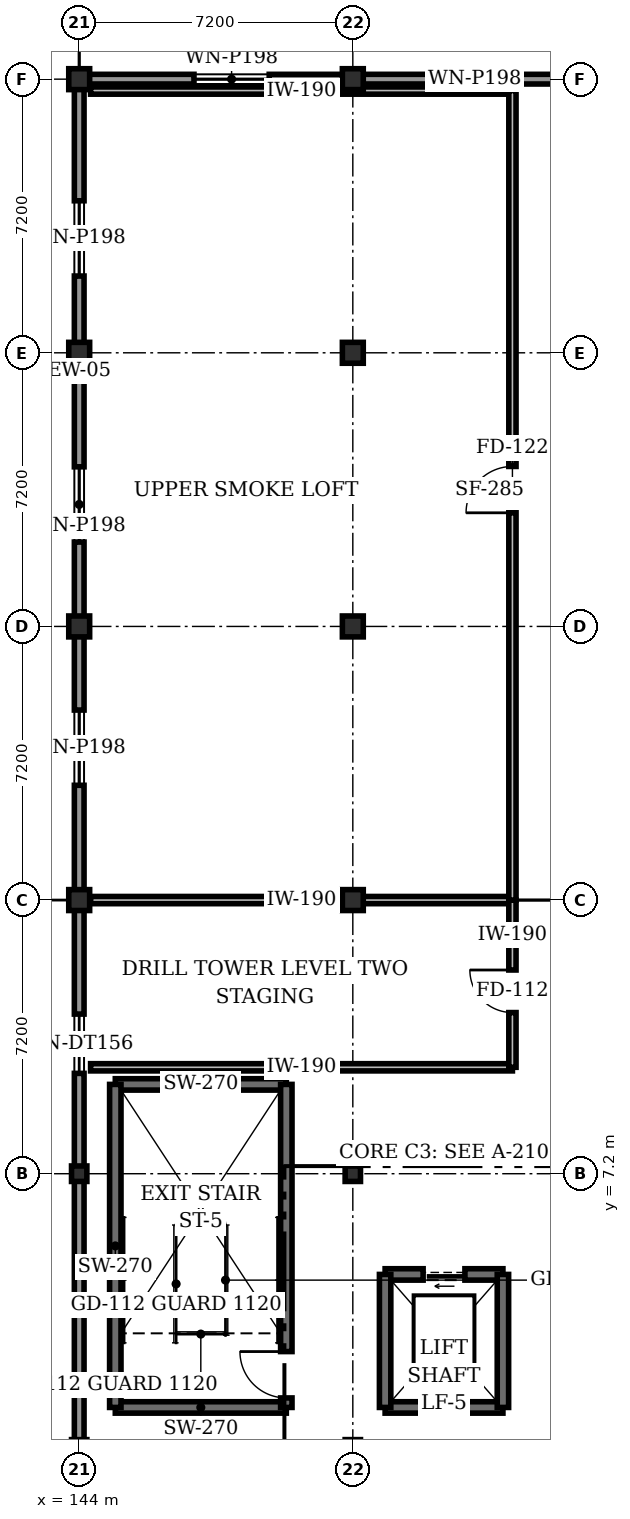
"""IFC4 building model, lengths in metres.
Left out: names, types, materials, properties, quantities, classifications, styles, units other than length and angle.
Written with IfcOpenShell. Run it as: python <this file> out.ifc"""

import sys

from ifc_helpers import new_model, si_unit, direction, frame, frame_2d, origin, origin_2d, place, context, subcontext, project, spatial, rectangle, i_section, extrude, element, fill, save


model = new_model("IFC4")
c1 = context("Model", 3, precision=1e-05, world=origin(), true_north=direction((0.0, 1.0)))
c2 = subcontext(c1, "Body", "Model", "MODEL_VIEW")
j1 = project(units=[si_unit("LENGTHUNIT", "METRE"), si_unit("PLANEANGLEUNIT", "RADIAN")], contexts=[c1])
p1 = place(None, origin())
s1 = spatial("IfcSite", under=j1, at=p1, CompositionType="ELEMENT")
p2 = place(p1, origin())
s2 = spatial("IfcBuilding", under=s1, at=p2, CompositionType="ELEMENT")
p3 = place(p2, frame((0.0, 0.0, 6.0)))
s3 = spatial("IfcBuildingStorey", under=s2, at=p3, CompositionType="ELEMENT", Elevation=6.0)
for number, where, z_axis, x_axis in (
    (1, (144.0, 0.0, 0.0), (0.0, 0.0, 1.0), (1.0, 0.0, 0.0)),
    (2, (144.0, 7.2, 0.0), (0.0, 0.0, 1.0), (1.0, 0.0, 0.0)),
):
    element("IfcColumn", number, at=place(p3, frame(where, z_axis=z_axis, x_axis=x_axis)), inside=s3, PredefinedType="COLUMN", context=c2, shape_type="SweptSolid", body=[
        extrude(i_section(OverallWidth=0.404, OverallDepth=0.407, WebThickness=0.027, FlangeThickness=0.044, at=origin_2d()), origin(), (0.0, 0.0, 1.0), 4.2),
    ])
for number, where, z_axis, x_axis in (
    (3, (144.0, 14.4, 0.0), (0.0, 0.0, 1.0), (1.0, 0.0, 0.0)),
    (4, (144.0, 21.6, 0.0), (0.0, 0.0, 1.0), (1.0, 0.0, 0.0)),
    (5, (144.0, 28.8, 0.0), (0.0, 0.0, 1.0), (1.0, 0.0, 0.0)),
    (6, (144.0, 36.0, 0.0), (0.0, 0.0, 1.0), (1.0, 0.0, 0.0)),
):
    element("IfcColumn", number, at=place(p3, frame(where, z_axis=z_axis, x_axis=x_axis)), inside=s3, PredefinedType="COLUMN", context=c2, shape_type="SweptSolid", body=[
        extrude(rectangle(XDim=0.55, YDim=0.55, at=origin_2d()), origin(), (0.0, 0.0, 1.0), 4.2),
    ])
for number, where, z_axis, x_axis in (
    (7, (151.2, 0.0, 0.0), (0.0, 0.0, 1.0), (1.0, 0.0, 0.0)),
    (8, (151.2, 7.2, 0.0), (0.0, 0.0, 1.0), (1.0, 0.0, 0.0)),
):
    element("IfcColumn", number, at=place(p3, frame(where, z_axis=z_axis, x_axis=x_axis)), inside=s3, PredefinedType="COLUMN", context=c2, shape_type="SweptSolid", body=[
        extrude(i_section(OverallWidth=0.404, OverallDepth=0.407, WebThickness=0.027, FlangeThickness=0.044, at=origin_2d()), origin(), (0.0, 0.0, 1.0), 4.2),
    ])
for number, where, z_axis, x_axis in (
    (9, (151.2, 14.4, 0.0), (0.0, 0.0, 1.0), (1.0, 0.0, 0.0)),
    (10, (151.2, 21.6, 0.0), (0.0, 0.0, 1.0), (1.0, 0.0, 0.0)),
    (11, (151.2, 28.8, 0.0), (0.0, 0.0, 1.0), (1.0, 0.0, 0.0)),
    (12, (151.2, 36.0, 0.0), (0.0, 0.0, 1.0), (1.0, 0.0, 0.0)),
):
    element("IfcColumn", number, at=place(p3, frame(where, z_axis=z_axis, x_axis=x_axis)), inside=s3, PredefinedType="COLUMN", context=c2, shape_type="SweptSolid", body=[
        extrude(rectangle(XDim=0.55, YDim=0.55, at=origin_2d()), origin(), (0.0, 0.0, 1.0), 4.2),
    ])
p4 = place(p3, frame((144.0, 36.0, 0.0), z_axis=(0.0, 0.0, 1.0), x_axis=(0.0, -1.0, 0.0)))
e13 = element("IfcWall", 13, at=p4, inside=s3, PredefinedType="STANDARD", context=c2, shape_type="SweptSolid", body=[
    extrude(rectangle(XDim=21.6, YDim=0.255, at=frame_2d((10.8, 0.0))), origin(), (0.0, 0.0, 1.0), 3.247),
])
p5 = place(p4, frame((3.2, 0.0, 1.15)))
e14 = element("IfcOpeningElement", 14, at=p5, cuts=e13, PredefinedType="OPENING", context=c2, shape_type="SweptSolid", body=[
    extrude(rectangle(XDim=1.98, YDim=1.72, at=frame_2d((0.99, 0.86))), frame((0.0, 0.137, 0.0), z_axis=(0.0, -1.0, 0.0), x_axis=(1.0, 0.0, 0.0)), (0.0, 0.0, 1.0), 0.275),
])
p6 = place(p4, frame((10.2, 0.0, 1.15)))
e15 = element("IfcOpeningElement", 15, at=p6, cuts=e13, PredefinedType="OPENING", context=c2, shape_type="SweptSolid", body=[
    extrude(rectangle(XDim=1.98, YDim=1.72, at=frame_2d((0.99, 0.86))), frame((0.0, 0.137, 0.0), z_axis=(0.0, -1.0, 0.0), x_axis=(1.0, 0.0, 0.0)), (0.0, 0.0, 1.0), 0.275),
])
p7 = place(p4, frame((16.6, 0.0, 1.15)))
e16 = element("IfcOpeningElement", 16, at=p7, cuts=e13, PredefinedType="OPENING", context=c2, shape_type="SweptSolid", body=[
    extrude(rectangle(XDim=1.98, YDim=1.72, at=frame_2d((0.99, 0.86))), frame((0.0, 0.137, 0.0), z_axis=(0.0, -1.0, 0.0), x_axis=(1.0, 0.0, 0.0)), (0.0, 0.0, 1.0), 0.275),
])
p8 = place(p3, frame((165.6, 36.0, 0.0), z_axis=(0.0, 0.0, 1.0), x_axis=(-1.0, 0.0, 0.0)))
e17 = element("IfcWall", 17, at=p8, inside=s3, PredefinedType="STANDARD", context=c2, shape_type="SweptSolid", body=[
    extrude(rectangle(XDim=21.6, YDim=0.255, at=frame_2d((10.8, 0.0))), origin(), (0.0, 0.0, 1.0), 3.25),
])
p9 = place(p8, frame((3.2, 0.0, 1.15)))
e18 = element("IfcOpeningElement", 18, at=p9, cuts=e17, PredefinedType="OPENING", context=c2, shape_type="SweptSolid", body=[
    extrude(rectangle(XDim=1.98, YDim=1.72, at=frame_2d((0.99, 0.86))), frame((0.0, 0.137, 0.0), z_axis=(0.0, -1.0, 0.0), x_axis=(1.0, 0.0, 0.0)), (0.0, 0.0, 1.0), 0.275),
])
p10 = place(p8, frame((10.2, 0.0, 1.15)))
e19 = element("IfcOpeningElement", 19, at=p10, cuts=e17, PredefinedType="OPENING", context=c2, shape_type="SweptSolid", body=[
    extrude(rectangle(XDim=1.98, YDim=1.72, at=frame_2d((0.99, 0.86))), frame((0.0, 0.137, 0.0), z_axis=(0.0, -1.0, 0.0), x_axis=(1.0, 0.0, 0.0)), (0.0, 0.0, 1.0), 0.275),
])
p11 = place(p8, frame((16.6, 0.0, 1.15)))
e20 = element("IfcOpeningElement", 20, at=p11, cuts=e17, PredefinedType="OPENING", context=c2, shape_type="SweptSolid", body=[
    extrude(rectangle(XDim=1.98, YDim=1.72, at=frame_2d((0.99, 0.86))), frame((0.0, 0.137, 0.0), z_axis=(0.0, -1.0, 0.0), x_axis=(1.0, 0.0, 0.0)), (0.0, 0.0, 1.0), 0.275),
])
p12 = place(p3, frame((144.0, 14.4, 0.0), z_axis=(0.0, 0.0, 1.0), x_axis=(0.0, -1.0, 0.0)))
e21 = element("IfcWall", 21, at=p12, inside=s3, PredefinedType="STANDARD", context=c2, shape_type="SweptSolid", body=[
    extrude(rectangle(XDim=14.4, YDim=0.255, at=frame_2d((7.2, 0.0))), origin(), (0.0, 0.0, 1.0), 3.247),
])
p13 = place(p12, frame((3.0, 0.0, 1.15)))
e22 = element("IfcOpeningElement", 22, at=p13, cuts=e21, PredefinedType="OPENING", context=c2, shape_type="SweptSolid", body=[
    extrude(rectangle(XDim=1.56, YDim=1.5, at=frame_2d((0.78, 0.75))), frame((0.0, 0.137, 0.0), z_axis=(0.0, -1.0, 0.0), x_axis=(1.0, 0.0, 0.0)), (0.0, 0.0, 1.0), 0.275),
])
for number, where, z_axis, x_axis in (
    (23, (144.95, 1.05, 0.0), (0.0, 0.0, 1.0), (1.0, 0.0, 0.0)),
    (24, (149.45, 9.55, 0.0), (0.0, 0.0, 1.0), (-1.0, 0.0, 0.0)),
):
    element("IfcWall", number, at=place(p3, frame(where, z_axis=z_axis, x_axis=x_axis)), inside=s3, PredefinedType="SHEAR", context=c2, shape_type="SweptSolid", body=[
        extrude(rectangle(XDim=4.5, YDim=0.3, at=frame_2d((2.25, 0.0))), origin(), (0.0, 0.0, 1.0), 3.94),
    ])
p14 = place(p3, frame((144.95, 9.55, 0.0), z_axis=(0.0, 0.0, 1.0), x_axis=(0.0, -1.0, 0.0)))
e25 = element("IfcWall", 25, at=p14, inside=s3, PredefinedType="SHEAR", context=c2, shape_type="SweptSolid", body=[
    extrude(rectangle(XDim=8.5, YDim=0.3, at=frame_2d((4.25, 0.0))), origin(), (0.0, 0.0, 1.0), 3.94),
])
p15 = place(p3, frame((149.45, 1.05, 0.0), z_axis=(0.0, 0.0, 1.0), x_axis=(0.0, 1.0, 0.0)))
e26 = element("IfcWall", 26, at=p15, inside=s3, PredefinedType="SHEAR", context=c2, shape_type="SweptSolid", body=[
    extrude(rectangle(XDim=8.5, YDim=0.3, at=frame_2d((4.25, 0.0))), origin(), (0.0, 0.0, 1.0), 3.94),
])
p16 = place(p15, frame((0.25, 0.0, 0.0)))
e27 = element("IfcOpeningElement", 27, at=p16, cuts=e26, PredefinedType="OPENING", context=c2, shape_type="SweptSolid", body=[
    extrude(rectangle(XDim=1.22, YDim=2.16, at=frame_2d((0.61, 1.08))), frame((0.0, 0.16, 0.0), z_axis=(0.0, -1.0, 0.0), x_axis=(1.0, 0.0, 0.0)), (0.0, 0.0, 1.0), 0.32),
])
p17 = place(p3, frame((152.05, 1.05, 0.0), z_axis=(0.0, 0.0, 1.0), x_axis=(1.0, 0.0, 0.0)))
e28 = element("IfcWall", 28, at=p17, inside=s3, PredefinedType="SHEAR", context=c2, shape_type="SweptSolid", body=[
    extrude(rectangle(XDim=3.1, YDim=0.3, at=frame_2d((1.55, 0.0))), origin(), (0.0, 0.0, 1.0), 3.94),
])
p18 = place(p3, frame((155.15, 4.55, 0.0), z_axis=(0.0, 0.0, 1.0), x_axis=(-1.0, 0.0, 0.0)))
e29 = element("IfcWall", 29, at=p18, inside=s3, PredefinedType="SHEAR", context=c2, shape_type="SweptSolid", body=[
    extrude(rectangle(XDim=3.1, YDim=0.3, at=frame_2d((1.55, 0.0))), origin(), (0.0, 0.0, 1.0), 3.94),
])
p19 = place(p18, frame((1.0, 0.0, 0.0)))
e30 = element("IfcOpeningElement", 30, at=p19, cuts=e29, PredefinedType="OPENING", context=c2, shape_type="SweptSolid", body=[
    extrude(rectangle(XDim=1.1, YDim=2.22, at=frame_2d((0.55, 1.11))), frame((0.0, 0.16, 0.0), z_axis=(0.0, -1.0, 0.0), x_axis=(1.0, 0.0, 0.0)), (0.0, 0.0, 1.0), 0.32),
])
for number, where, z_axis, x_axis in (
    (31, (152.05, 4.55, 0.0), (0.0, 0.0, 1.0), (0.0, -1.0, 0.0)),
    (32, (155.15, 1.05, 0.0), (0.0, 0.0, 1.0), (0.0, 1.0, 0.0)),
):
    element("IfcWall", number, at=place(p3, frame(where, z_axis=z_axis, x_axis=x_axis)), inside=s3, PredefinedType="SHEAR", context=c2, shape_type="SweptSolid", body=[
        extrude(rectangle(XDim=3.5, YDim=0.3, at=frame_2d((1.75, 0.0))), origin(), (0.0, 0.0, 1.0), 3.94),
    ])
p20 = place(p3, frame((144.3, 10.0, 0.0), z_axis=(0.0, 0.0, 1.0), x_axis=(1.0, 0.0, 0.0)))
e33 = element("IfcWall", 33, at=p20, inside=s3, PredefinedType="STANDARD", context=c2, shape_type="SweptSolid", body=[
    extrude(rectangle(XDim=11.1, YDim=0.19, at=frame_2d((5.55, 0.0))), origin(), (0.0, 0.0, 1.0), 3.328),
])
p21 = place(p3, frame((155.4, 14.4, 0.0), z_axis=(0.0, 0.0, 1.0), x_axis=(-1.0, 0.0, 0.0)))
e34 = element("IfcWall", 34, at=p21, inside=s3, PredefinedType="STANDARD", context=c2, shape_type="SweptSolid", body=[
    extrude(rectangle(XDim=11.1, YDim=0.19, at=frame_2d((5.55, 0.0))), origin(), (0.0, 0.0, 1.0), 3.247),
])
p22 = place(p3, frame((155.4, 10.0, 0.0), z_axis=(0.0, 0.0, 1.0), x_axis=(0.0, 1.0, 0.0)))
e35 = element("IfcWall", 35, at=p22, inside=s3, PredefinedType="STANDARD", context=c2, shape_type="SweptSolid", body=[
    extrude(rectangle(XDim=4.4, YDim=0.19, at=frame_2d((2.2, 0.0))), origin(), (0.0, 0.0, 1.0), 3.247),
])
p23 = place(p22, frame((1.44, 0.0, 0.0)))
e36 = element("IfcOpeningElement", 36, at=p23, cuts=e35, PredefinedType="OPENING", context=c2, shape_type="SweptSolid", body=[
    extrude(rectangle(XDim=1.12, YDim=2.16, at=frame_2d((0.56, 1.08))), frame((0.0, 0.105, 0.0), z_axis=(0.0, -1.0, 0.0), x_axis=(1.0, 0.0, 0.0)), (0.0, 0.0, 1.0), 0.21),
])
p24 = place(p3, frame((155.4, 35.7, 0.0), z_axis=(0.0, 0.0, 1.0), x_axis=(-1.0, 0.0, 0.0)))
e37 = element("IfcWall", 37, at=p24, inside=s3, PredefinedType="STANDARD", context=c2, shape_type="SweptSolid", body=[
    extrude(rectangle(XDim=11.1, YDim=0.19, at=frame_2d((5.55, 0.0))), origin(), (0.0, 0.0, 1.0), 3.378),
])
p25 = place(p3, frame((155.4, 14.4, 0.0), z_axis=(0.0, 0.0, 1.0), x_axis=(0.0, 1.0, 0.0)))
e38 = element("IfcWall", 38, at=p25, inside=s3, PredefinedType="STANDARD", context=c2, shape_type="SweptSolid", body=[
    extrude(rectangle(XDim=21.3, YDim=0.19, at=frame_2d((10.65, 0.0))), origin(), (0.0, 0.0, 1.0), 3.247),
])
p26 = place(p25, frame((10.19, 0.0, 0.0)))
e39 = element("IfcOpeningElement", 39, at=p26, cuts=e38, PredefinedType="OPENING", context=c2, shape_type="SweptSolid", body=[
    extrude(rectangle(XDim=1.22, YDim=2.2, at=frame_2d((0.61, 1.1))), frame((0.0, 0.105, 0.0), z_axis=(0.0, -1.0, 0.0), x_axis=(1.0, 0.0, 0.0)), (0.0, 0.0, 1.0), 0.21),
])
p27 = place(p5, origin())
e40 = element("IfcWindow", 40, at=p27, inside=s3, PartitioningType="SINGLE_PANEL", PredefinedType="WINDOW", context=c2, shape_type="SweptSolid", body=[
    extrude(rectangle(XDim=1.98, YDim=1.72, at=frame_2d((0.99, 0.86))), frame((0.0, 0.03, 0.0), z_axis=(0.0, -1.0, 0.0), x_axis=(1.0, 0.0, 0.0)), (0.0, 0.0, 1.0), 0.06),
])
fill(e14, e40)
p28 = place(p6, origin())
e41 = element("IfcWindow", 41, at=p28, inside=s3, PartitioningType="SINGLE_PANEL", PredefinedType="WINDOW", context=c2, shape_type="SweptSolid", body=[
    extrude(rectangle(XDim=1.98, YDim=1.72, at=frame_2d((0.99, 0.86))), frame((0.0, 0.03, 0.0), z_axis=(0.0, -1.0, 0.0), x_axis=(1.0, 0.0, 0.0)), (0.0, 0.0, 1.0), 0.06),
])
fill(e15, e41)
p29 = place(p7, origin())
e42 = element("IfcWindow", 42, at=p29, inside=s3, PartitioningType="SINGLE_PANEL", PredefinedType="WINDOW", context=c2, shape_type="SweptSolid", body=[
    extrude(rectangle(XDim=1.98, YDim=1.72, at=frame_2d((0.99, 0.86))), frame((0.0, 0.03, 0.0), z_axis=(0.0, -1.0, 0.0), x_axis=(1.0, 0.0, 0.0)), (0.0, 0.0, 1.0), 0.06),
])
fill(e16, e42)
p30 = place(p10, origin())
e43 = element("IfcWindow", 43, at=p30, inside=s3, PartitioningType="SINGLE_PANEL", PredefinedType="WINDOW", context=c2, shape_type="SweptSolid", body=[
    extrude(rectangle(XDim=1.98, YDim=1.72, at=frame_2d((0.99, 0.86))), frame((0.0, 0.03, 0.0), z_axis=(0.0, -1.0, 0.0), x_axis=(1.0, 0.0, 0.0)), (0.0, 0.0, 1.0), 0.06),
])
fill(e19, e43)
p31 = place(p11, origin())
e44 = element("IfcWindow", 44, at=p31, inside=s3, PartitioningType="SINGLE_PANEL", PredefinedType="WINDOW", context=c2, shape_type="SweptSolid", body=[
    extrude(rectangle(XDim=1.98, YDim=1.72, at=frame_2d((0.99, 0.86))), frame((0.0, 0.03, 0.0), z_axis=(0.0, -1.0, 0.0), x_axis=(1.0, 0.0, 0.0)), (0.0, 0.0, 1.0), 0.06),
])
fill(e20, e44)
p32 = place(p13, origin())
e45 = element("IfcWindow", 45, at=p32, inside=s3, PartitioningType="SINGLE_PANEL", PredefinedType="WINDOW", context=c2, shape_type="SweptSolid", body=[
    extrude(rectangle(XDim=1.56, YDim=1.5, at=frame_2d((0.78, 0.75))), frame((0.0, 0.03, 0.0), z_axis=(0.0, -1.0, 0.0), x_axis=(1.0, 0.0, 0.0)), (0.0, 0.0, 1.0), 0.06),
])
fill(e22, e45)
p33 = place(p16, origin())
e46 = element("IfcDoor", 46, at=p33, inside=s3, OperationType="SINGLE_SWING_RIGHT", PredefinedType="DOOR", context=c2, shape_type="SweptSolid", body=[
    extrude(rectangle(XDim=1.22, YDim=2.16, at=frame_2d((0.61, 1.08))), frame((0.0, 0.025, 0.0), z_axis=(0.0, -1.0, 0.0), x_axis=(1.0, 0.0, 0.0)), (0.0, 0.0, 1.0), 0.05),
])
fill(e27, e46)
p34 = place(p19, origin())
e47 = element("IfcDoor", 47, at=p34, inside=s3, OperationType="SLIDING_TO_LEFT", PredefinedType="DOOR", context=c2, shape_type="SweptSolid", body=[
    extrude(rectangle(XDim=1.1, YDim=2.22, at=frame_2d((0.55, 1.11))), frame((0.0, 0.025, 0.0), z_axis=(0.0, -1.0, 0.0), x_axis=(1.0, 0.0, 0.0)), (0.0, 0.0, 1.0), 0.05),
])
fill(e30, e47)
p35 = place(p23, origin())
e48 = element("IfcDoor", 48, at=p35, inside=s3, OperationType="SINGLE_SWING_RIGHT", PredefinedType="DOOR", context=c2, shape_type="SweptSolid", body=[
    extrude(rectangle(XDim=1.12, YDim=2.16, at=frame_2d((0.56, 1.08))), frame((0.0, 0.025, 0.0), z_axis=(0.0, -1.0, 0.0), x_axis=(1.0, 0.0, 0.0)), (0.0, 0.0, 1.0), 0.05),
])
fill(e36, e48)
p36 = place(p26, origin())
e49 = element("IfcDoor", 49, at=p36, inside=s3, OperationType="SINGLE_SWING_LEFT", PredefinedType="DOOR", context=c2, shape_type="SweptSolid", body=[
    extrude(rectangle(XDim=1.22, YDim=2.2, at=frame_2d((0.61, 1.1))), frame((0.0, 0.025, 0.0), z_axis=(0.0, -1.0, 0.0), x_axis=(1.0, 0.0, 0.0)), (0.0, 0.0, 1.0), 0.05),
])
fill(e39, e49)
save(model, sys.argv[1])
